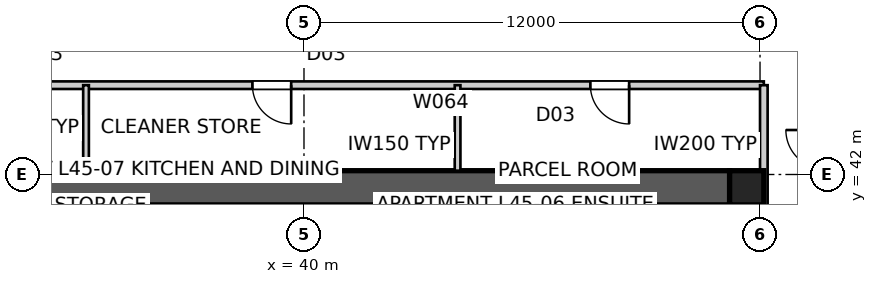
"""IFC4 building model, lengths in metres.
Left out: names, types, materials, properties, quantities, classifications, styles, units other than length and angle.
Written with IfcOpenShell. Run it as: python <this file> out.ifc"""

import sys

from ifc_helpers import new_model, si_unit, direction, frame, frame_2d, origin, origin_2d, place, context, subcontext, project, spatial, polyline, rectangle, outline, extrude, element, fill, save


model = new_model("IFC4")
c1 = context("Model", 3, precision=1e-05, world=origin(), true_north=direction((0.0, 1.0)))
c2 = subcontext(c1, "Body", "Model", "MODEL_VIEW")
j1 = project(units=[si_unit("LENGTHUNIT", "METRE"), si_unit("PLANEANGLEUNIT", "RADIAN")], contexts=[c1])
p1 = place(None, origin())
s1 = spatial("IfcSite", under=j1, at=p1, CompositionType="ELEMENT")
p2 = place(p1, origin())
s2 = spatial("IfcBuilding", under=s1, at=p2, CompositionType="ELEMENT")
p3 = place(p2, frame((0.0, 0.0, 164.2)))
s3 = spatial("IfcBuildingStorey", under=s2, at=p3, CompositionType="ELEMENT", Elevation=164.2)
p4 = place(p3, frame((28.8, 41.65, 0.0), z_axis=(0.0, 0.0, 1.0), x_axis=(1.0, 0.0, 0.0)))
e1 = element("IfcWall", 1, at=p4, inside=s3, PredefinedType="SHEAR", context=c2, shape_type="SweptSolid", body=[
    extrude(outline(polyline([(0.0, -0.45), (22.4, -0.45), (22.4, -0.025), (22.85, -0.025), (22.85, 0.025), (22.4, 0.025), (22.4, 0.45), (0.0, 0.45), (0.0, 0.025), (-0.45, 0.025), (-0.45, -0.025), (0.0, -0.025), (0.0, -0.45)])), origin(), (0.0, 0.0, 1.0), 3.4),
])
p5 = place(p3, frame((51.65, 18.8, 0.0), z_axis=(0.0, 0.0, 1.0), x_axis=(0.0, 1.0, 0.0)))
e2 = element("IfcWall", 2, at=p5, inside=s3, PredefinedType="SHEAR", context=c2, shape_type="SweptSolid", body=[
    extrude(outline(polyline([(0.0, -0.45), (22.4, -0.45), (22.4, -0.025), (22.85, -0.025), (22.85, 0.025), (22.4, 0.025), (22.4, 0.45), (0.0, 0.45), (0.0, 0.025), (-0.45, 0.025), (-0.45, -0.025), (0.0, -0.025), (0.0, -0.45)])), origin(), (0.0, 0.0, 1.0), 3.4),
])
p6 = place(p5, frame((11.14, 0.0, 0.0)))
e3 = element("IfcOpeningElement", 3, at=p6, cuts=e2, PredefinedType="OPENING", context=c2, shape_type="SweptSolid", body=[
    extrude(rectangle(XDim=1.02, YDim=2.4, at=frame_2d((0.51, 1.2))), frame((0.0, 0.46, 0.0), z_axis=(0.0, -1.0, 0.0), x_axis=(1.0, 0.0, 0.0)), (0.0, 0.0, 1.0), 0.92),
])
p7 = place(p3, frame((51.65, 41.65, 0.0), z_axis=(0.0, 0.0, 1.0), x_axis=(1.0, 0.0, 0.0)))
e4 = element("IfcColumn", 4, at=p7, inside=s3, PredefinedType="COLUMN", context=c2, shape_type="SweptSolid", body=[
    extrude(rectangle(XDim=0.9, YDim=0.9, at=origin_2d()), origin(), (0.0, 0.0, 1.0), 3.4),
])
p8 = place(p3, frame((52.1, 44.35, 0.0), z_axis=(0.0, 0.0, 1.0), x_axis=(-1.0, 0.0, 0.0)))
e5 = element("IfcWall", 5, at=p8, inside=s3, PredefinedType="PARTITIONING", context=c2, shape_type="SweptSolid", body=[
    extrude(rectangle(XDim=24.2, YDim=0.2, at=frame_2d((12.1, 0.0))), origin(), (0.0, 0.0, 1.0), 3.25),
])
p9 = place(p8, frame((12.437, 0.0, 0.0)))
e6 = element("IfcOpeningElement", 6, at=p9, cuts=e5, PredefinedType="OPENING", context=c2, shape_type="SweptSolid", body=[
    extrude(rectangle(XDim=1.02, YDim=2.1, at=frame_2d((0.51, 1.05))), frame((0.0, 0.11, 0.0), z_axis=(0.0, -1.0, 0.0), x_axis=(1.0, 0.0, 0.0)), (0.0, 0.0, 1.0), 0.22),
])
p10 = place(p8, frame((3.544, 0.0, 0.0)))
e7 = element("IfcOpeningElement", 7, at=p10, cuts=e5, PredefinedType="OPENING", context=c2, shape_type="SweptSolid", body=[
    extrude(rectangle(XDim=1.02, YDim=2.1, at=frame_2d((0.51, 1.05))), frame((0.0, 0.11, 0.0), z_axis=(0.0, -1.0, 0.0), x_axis=(1.0, 0.0, 0.0)), (0.0, 0.0, 1.0), 0.22),
])
p11 = place(p8, frame((19.883, 0.0, 0.0)))
e8 = element("IfcOpeningElement", 8, at=p11, cuts=e5, PredefinedType="OPENING", context=c2, shape_type="SweptSolid", body=[
    extrude(rectangle(XDim=1.02, YDim=2.1, at=frame_2d((0.51, 1.05))), frame((0.0, 0.11, 0.0), z_axis=(0.0, -1.0, 0.0), x_axis=(1.0, 0.0, 0.0)), (0.0, 0.0, 1.0), 0.22),
])
p12 = place(p3, frame((52.1, 41.18, 0.0), z_axis=(0.0, 0.0, 1.0), x_axis=(0.0, 1.0, 0.0)))
e9 = element("IfcWall", 9, at=p12, inside=s3, PredefinedType="PARTITIONING", context=c2, shape_type="SweptSolid", body=[
    extrude(rectangle(XDim=3.17, YDim=0.2, at=frame_2d((1.585, 0.0))), origin(), (0.0, 0.0, 1.0), 3.25),
])
p13 = place(p3, frame((34.265, 42.1, 0.0), z_axis=(0.0, 0.0, 1.0), x_axis=(0.0, 1.0, 0.0)))
e10 = element("IfcWall", 10, at=p13, inside=s3, PredefinedType="SOLIDWALL", context=c2, shape_type="SweptSolid", body=[
    extrude(rectangle(XDim=2.25, YDim=0.15, at=frame_2d((1.125, 0.0))), origin(), (0.0, 0.0, 1.0), 2.796),
])
p14 = place(p3, frame((44.042, 42.1, 0.0), z_axis=(0.0, 0.0, 1.0), x_axis=(0.0, 1.0, 0.0)))
e11 = element("IfcWall", 11, at=p14, inside=s3, PredefinedType="SOLIDWALL", context=c2, shape_type="SweptSolid", body=[
    extrude(rectangle(XDim=2.25, YDim=0.15, at=frame_2d((1.125, 0.0))), origin(), (0.0, 0.0, 1.0), 3.25),
])
p15 = place(p9, origin())
e12 = element("IfcDoor", 12, at=p15, inside=s3, OperationType="SINGLE_SWING_LEFT", PredefinedType="DOOR", context=c2, shape_type="SweptSolid", body=[
    extrude(rectangle(XDim=1.02, YDim=2.1, at=frame_2d((0.51, 1.05))), frame((0.0, 0.025, 0.0), z_axis=(0.0, -1.0, 0.0), x_axis=(1.0, 0.0, 0.0)), (0.0, 0.0, 1.0), 0.05),
])
fill(e6, e12)
p16 = place(p10, origin())
e13 = element("IfcDoor", 13, at=p16, inside=s3, OperationType="SINGLE_SWING_LEFT", PredefinedType="DOOR", context=c2, shape_type="SweptSolid", body=[
    extrude(rectangle(XDim=1.02, YDim=2.1, at=frame_2d((0.51, 1.05))), frame((0.0, 0.025, 0.0), z_axis=(0.0, -1.0, 0.0), x_axis=(1.0, 0.0, 0.0)), (0.0, 0.0, 1.0), 0.05),
])
fill(e7, e13)
save(model, sys.argv[1])
